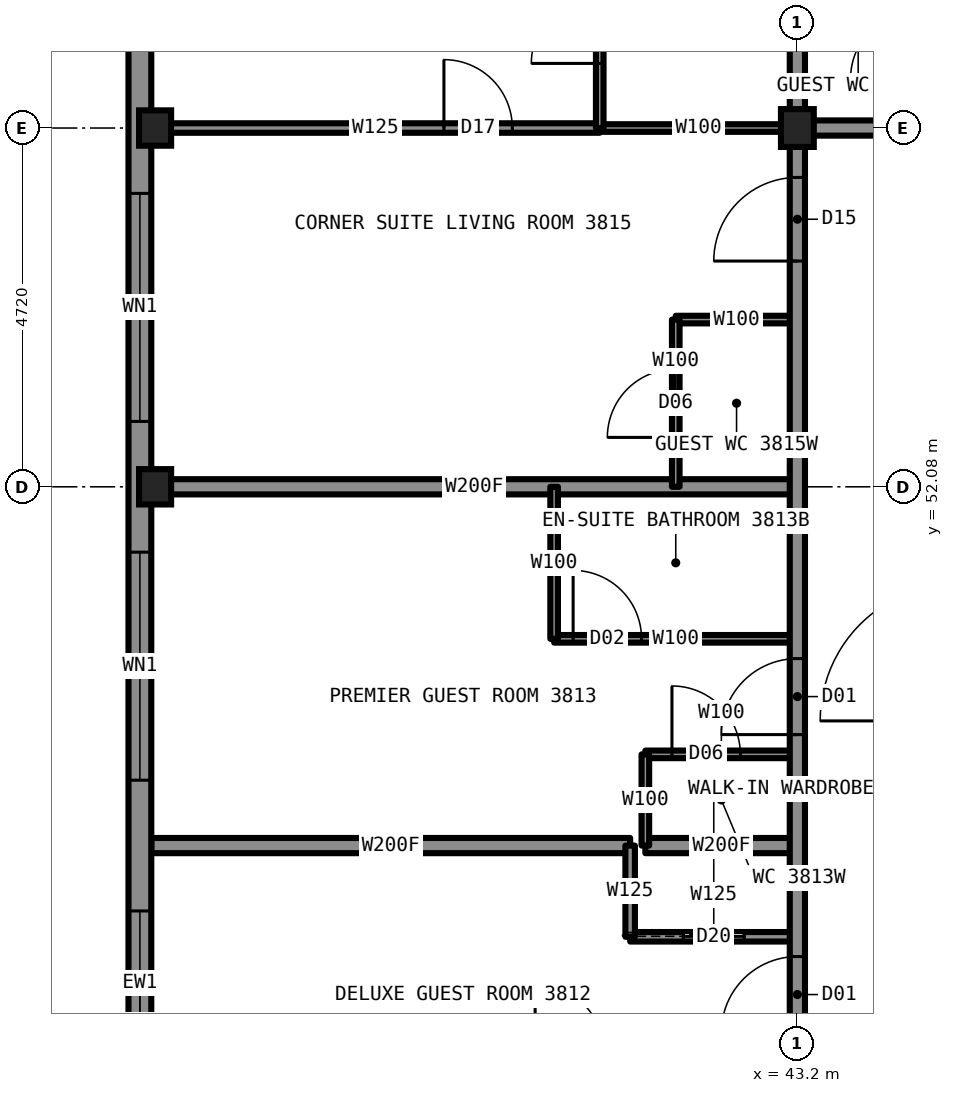
"""IFC4 building model, lengths in metres.
Left out: names, types, materials, properties, quantities, classifications, styles, units other than length and angle.
Written with IfcOpenShell. Run it as: python <this file> out.ifc"""

import sys

from ifc_helpers import new_model, si_unit, direction, frame, frame_2d, origin, origin_2d, place, context, subcontext, project, spatial, rectangle, i_section, extrude, element, fill, save


model = new_model("IFC4")
c1 = context("Model", 3, precision=1e-05, world=origin(), true_north=direction((0.0, 1.0)))
c2 = subcontext(c1, "Body", "Model", "MODEL_VIEW")
j1 = project(units=[si_unit("LENGTHUNIT", "METRE"), si_unit("PLANEANGLEUNIT", "RADIAN")], contexts=[c1])
p1 = place(None, origin())
s1 = spatial("IfcSite", under=j1, at=p1, CompositionType="ELEMENT")
p2 = place(p1, origin())
s2 = spatial("IfcBuilding", under=s1, at=p2, CompositionType="ELEMENT")
p3 = place(p2, frame((0.0, 0.0, 135.4)))
s3 = spatial("IfcBuildingStorey", under=s2, at=p3, CompositionType="ELEMENT", Elevation=135.4)
for number, where, z_axis, x_axis in (
    (1, (34.75, 52.08, 0.0), (0.0, 0.0, 1.0), (1.0, 0.0, 0.0)),
    (2, (34.75, 56.8, 0.0), (0.0, 0.0, 1.0), (1.0, 0.0, 0.0)),
):
    element("IfcColumn", number, at=place(p3, frame(where, z_axis=z_axis, x_axis=x_axis)), inside=s3, PredefinedType="COLUMN", context=c2, shape_type="SweptSolid", body=[
        extrude(i_section(OverallWidth=0.422, OverallDepth=0.465, WebThickness=0.045, FlangeThickness=0.073, at=origin_2d()), origin(), (0.0, 0.0, 1.0), 3.5),
    ])
p4 = place(p3, frame((43.2, 56.8, 0.0), z_axis=(0.0, 0.0, 1.0), x_axis=(1.0, 0.0, 0.0)))
e3 = element("IfcColumn", 3, at=p4, inside=s3, PredefinedType="COLUMN", context=c2, shape_type="SweptSolid", body=[
    extrude(i_section(OverallWidth=0.432, OverallDepth=0.498, WebThickness=0.056, FlangeThickness=0.089, at=origin_2d()), origin(), (0.0, 0.0, 1.0), 3.5),
])
p5 = place(p3, frame((41.0, 46.16, 0.0), z_axis=(0.0, 0.0, 1.0), x_axis=(1.0, 0.0, 0.0)))
e4 = element("IfcWall", 4, at=p5, inside=s3, PredefinedType="PARTITIONING", context=c2, shape_type="SweptSolid", body=[
    extrude(rectangle(XDim=2.2, YDim=0.125, at=frame_2d((1.1, 0.0))), origin(), (0.0, 0.0, 1.0), 3.33),
])
p6 = place(p5, frame((0.7, 0.0, 0.0)))
e5 = element("IfcOpeningElement", 5, at=p6, cuts=e4, PredefinedType="OPENING", context=c2, shape_type="SweptSolid", body=[
    extrude(rectangle(XDim=0.8, YDim=2.1, at=frame_2d((0.4, 1.05))), frame((0.0, 0.073, 0.0), z_axis=(0.0, -1.0, 0.0), x_axis=(1.0, 0.0, 0.0)), (0.0, 0.0, 1.0), 0.145),
])
p7 = place(p3, frame((40.6, 56.8, 0.0), z_axis=(0.0, 0.0, 1.0), x_axis=(1.0, 0.0, 0.0)))
e6 = element("IfcWall", 6, at=p7, inside=s3, PredefinedType="PARTITIONING", context=c2, shape_type="SweptSolid", body=[
    extrude(rectangle(XDim=2.6, YDim=0.1, at=frame_2d((1.3, 0.0))), origin(), (0.0, 0.0, 1.0), 2.573),
])
p8 = place(p3, frame((43.2, 56.8, 0.0), z_axis=(0.0, 0.0, 1.0), x_axis=(1.0, 0.0, 0.0)))
e7 = element("IfcWall", 7, at=p8, inside=s3, PredefinedType="PARTITIONING", context=c2, shape_type="SweptSolid", body=[
    extrude(rectangle(XDim=23.6, YDim=0.2, at=frame_2d((11.8, 0.0))), origin(), (0.0, 0.0, 1.0), 3.33),
])
p9 = place(p8, frame((1.85, 0.0, 0.0)))
e8 = element("IfcOpeningElement", 8, at=p9, cuts=e7, PredefinedType="OPENING", context=c2, shape_type="SweptSolid", body=[
    extrude(rectangle(XDim=1.1, YDim=2.2, at=frame_2d((0.55, 1.1))), frame((0.0, 0.11, 0.0), z_axis=(0.0, -1.0, 0.0), x_axis=(1.0, 0.0, 0.0)), (0.0, 0.0, 1.0), 0.22),
])
p10 = place(p8, frame((14.56, 0.0, 0.0)))
e9 = element("IfcOpeningElement", 9, at=p10, cuts=e7, PredefinedType="OPENING", context=c2, shape_type="SweptSolid", body=[
    extrude(rectangle(XDim=1.0, YDim=2.2, at=frame_2d((0.5, 1.1))), frame((0.0, 0.11, 0.0), z_axis=(0.0, -1.0, 0.0), x_axis=(1.0, 0.0, 0.0)), (0.0, 0.0, 1.0), 0.22),
])
p11 = place(p8, frame((21.14, 0.0, 0.0)))
e10 = element("IfcOpeningElement", 10, at=p11, cuts=e7, PredefinedType="OPENING", context=c2, shape_type="SweptSolid", body=[
    extrude(rectangle(XDim=1.0, YDim=2.2, at=frame_2d((0.5, 1.1))), frame((0.0, 0.11, 0.0), z_axis=(0.0, -1.0, 0.0), x_axis=(1.0, 0.0, 0.0)), (0.0, 0.0, 1.0), 0.22),
])
p12 = place(p3, frame((34.7, 56.8, 0.0), z_axis=(0.0, 0.0, 1.0), x_axis=(1.0, 0.0, 0.0)))
e11 = element("IfcWall", 11, at=p12, inside=s3, PredefinedType="PARTITIONING", context=c2, shape_type="SweptSolid", body=[
    extrude(rectangle(XDim=5.9, YDim=0.125, at=frame_2d((2.95, 0.0))), origin(), (0.0, 0.0, 1.0), 2.573),
])
p13 = place(p12, frame((3.85, 0.0, 0.0)))
e12 = element("IfcOpeningElement", 12, at=p13, cuts=e11, PredefinedType="OPENING", context=c2, shape_type="SweptSolid", body=[
    extrude(rectangle(XDim=0.9, YDim=2.2, at=frame_2d((0.45, 1.1))), frame((0.0, 0.073, 0.0), z_axis=(0.0, -1.0, 0.0), x_axis=(1.0, 0.0, 0.0)), (0.0, 0.0, 1.0), 0.145),
])
p14 = place(p3, frame((34.7, 47.36, 0.0), z_axis=(0.0, 0.0, 1.0), x_axis=(1.0, 0.0, 0.0)))
e13 = element("IfcWall", 13, at=p14, inside=s3, PredefinedType="PARTITIONING", context=c2, shape_type="SweptSolid", body=[
    extrude(rectangle(XDim=6.3, YDim=0.2, at=frame_2d((3.15, 0.0))), origin(), (0.0, 0.0, 1.0), 2.731),
])
p15 = place(p3, frame((41.2, 47.36, 0.0), z_axis=(0.0, 0.0, 1.0), x_axis=(1.0, 0.0, 0.0)))
e14 = element("IfcWall", 14, at=p15, inside=s3, PredefinedType="PARTITIONING", context=c2, shape_type="SweptSolid", body=[
    extrude(rectangle(XDim=2.0, YDim=0.2, at=frame_2d((1.0, 0.0))), origin(), (0.0, 0.0, 1.0), 2.731),
])
p16 = place(p3, frame((41.2, 48.56, 0.0), z_axis=(0.0, 0.0, 1.0), x_axis=(1.0, 0.0, 0.0)))
e15 = element("IfcWall", 15, at=p16, inside=s3, PredefinedType="PARTITIONING", context=c2, shape_type="SweptSolid", body=[
    extrude(rectangle(XDim=2.0, YDim=0.1, at=frame_2d((1.0, 0.0))), origin(), (0.0, 0.0, 1.0), 3.33),
])
p17 = place(p16, frame((0.35, 0.0, 0.0)))
e16 = element("IfcOpeningElement", 16, at=p17, cuts=e15, PredefinedType="OPENING", context=c2, shape_type="SweptSolid", body=[
    extrude(rectangle(XDim=0.9, YDim=2.1, at=frame_2d((0.45, 1.05))), frame((0.0, 0.06, 0.0), z_axis=(0.0, -1.0, 0.0), x_axis=(1.0, 0.0, 0.0)), (0.0, 0.0, 1.0), 0.12),
])
p18 = place(p3, frame((40.0, 50.08, 0.0), z_axis=(0.0, 0.0, 1.0), x_axis=(1.0, 0.0, 0.0)))
e17 = element("IfcWall", 17, at=p18, inside=s3, PredefinedType="PARTITIONING", context=c2, shape_type="SweptSolid", body=[
    extrude(rectangle(XDim=3.2, YDim=0.1, at=frame_2d((1.6, 0.0))), origin(), (0.0, 0.0, 1.0), 3.33),
])
p19 = place(p18, frame((0.25, 0.0, 0.0)))
e18 = element("IfcOpeningElement", 18, at=p19, cuts=e17, PredefinedType="OPENING", context=c2, shape_type="SweptSolid", body=[
    extrude(rectangle(XDim=0.9, YDim=2.1, at=frame_2d((0.45, 1.05))), frame((0.0, 0.06, 0.0), z_axis=(0.0, -1.0, 0.0), x_axis=(1.0, 0.0, 0.0)), (0.0, 0.0, 1.0), 0.12),
])
p20 = place(p3, frame((34.7, 52.08, 0.0), z_axis=(0.0, 0.0, 1.0), x_axis=(1.0, 0.0, 0.0)))
e19 = element("IfcWall", 19, at=p20, inside=s3, PredefinedType="PARTITIONING", context=c2, shape_type="SweptSolid", body=[
    extrude(rectangle(XDim=8.5, YDim=0.2, at=frame_2d((4.25, 0.0))), origin(), (0.0, 0.0, 1.0), 2.573),
])
p21 = place(p3, frame((41.6, 54.28, 0.0), z_axis=(0.0, 0.0, 1.0), x_axis=(1.0, 0.0, 0.0)))
e20 = element("IfcWall", 20, at=p21, inside=s3, PredefinedType="PARTITIONING", context=c2, shape_type="SweptSolid", body=[
    extrude(rectangle(XDim=1.6, YDim=0.1, at=frame_2d((0.8, 0.0))), origin(), (0.0, 0.0, 1.0), 3.33),
])
p22 = place(p3, frame((43.2, 33.2, 0.0), z_axis=(0.0, 0.0, 1.0), x_axis=(0.0, 1.0, 0.0)))
e21 = element("IfcWall", 21, at=p22, inside=s3, PredefinedType="PARTITIONING", context=c2, shape_type="SweptSolid", body=[
    extrude(rectangle(XDim=23.6, YDim=0.2, at=frame_2d((11.8, 0.0))), origin(), (0.0, 0.0, 1.0), 3.33),
])
p23 = place(p22, frame((6.98, 0.0, 0.0)))
e22 = element("IfcOpeningElement", 22, at=p23, cuts=e21, PredefinedType="OPENING", context=c2, shape_type="SweptSolid", body=[
    extrude(rectangle(XDim=1.0, YDim=2.2, at=frame_2d((0.5, 1.1))), frame((0.0, 0.11, 0.0), z_axis=(0.0, -1.0, 0.0), x_axis=(1.0, 0.0, 0.0)), (0.0, 0.0, 1.0), 0.22),
])
p24 = place(p22, frame((11.7, 0.0, 0.0)))
e23 = element("IfcOpeningElement", 23, at=p24, cuts=e21, PredefinedType="OPENING", context=c2, shape_type="SweptSolid", body=[
    extrude(rectangle(XDim=1.0, YDim=2.2, at=frame_2d((0.5, 1.1))), frame((0.0, 0.11, 0.0), z_axis=(0.0, -1.0, 0.0), x_axis=(1.0, 0.0, 0.0)), (0.0, 0.0, 1.0), 0.22),
])
p25 = place(p22, frame((15.62, 0.0, 0.0)))
e24 = element("IfcOpeningElement", 24, at=p25, cuts=e21, PredefinedType="OPENING", context=c2, shape_type="SweptSolid", body=[
    extrude(rectangle(XDim=1.0, YDim=2.2, at=frame_2d((0.5, 1.1))), frame((0.0, 0.11, 0.0), z_axis=(0.0, -1.0, 0.0), x_axis=(1.0, 0.0, 0.0)), (0.0, 0.0, 1.0), 0.22),
])
p26 = place(p22, frame((21.85, 0.0, 0.0)))
e25 = element("IfcOpeningElement", 25, at=p26, cuts=e21, PredefinedType="OPENING", context=c2, shape_type="SweptSolid", body=[
    extrude(rectangle(XDim=1.1, YDim=2.2, at=frame_2d((0.55, 1.1))), frame((0.0, 0.11, 0.0), z_axis=(0.0, -1.0, 0.0), x_axis=(1.0, 0.0, 0.0)), (0.0, 0.0, 1.0), 0.22),
])
p27 = place(p22, frame((0.65, 0.0, 0.0)))
e26 = element("IfcOpeningElement", 26, at=p27, cuts=e21, PredefinedType="OPENING", context=c2, shape_type="SweptSolid", body=[
    extrude(rectangle(XDim=1.1, YDim=2.2, at=frame_2d((0.55, 1.1))), frame((0.0, 0.11, 0.0), z_axis=(0.0, -1.0, 0.0), x_axis=(1.0, 0.0, 0.0)), (0.0, 0.0, 1.0), 0.22),
])
p28 = place(p3, frame((43.2, 56.8, 0.0), z_axis=(0.0, 0.0, 1.0), x_axis=(0.0, 1.0, 0.0)))
e27 = element("IfcWall", 27, at=p28, inside=s3, PredefinedType="PARTITIONING", context=c2, shape_type="SweptSolid", body=[
    extrude(rectangle(XDim=8.5, YDim=0.2, at=frame_2d((4.25, 0.0))), origin(), (0.0, 0.0, 1.0), 2.573),
])
p29 = place(p3, frame((41.6, 52.08, 0.0), z_axis=(0.0, 0.0, 1.0), x_axis=(0.0, 1.0, 0.0)))
e28 = element("IfcWall", 28, at=p29, inside=s3, PredefinedType="PARTITIONING", context=c2, shape_type="SweptSolid", body=[
    extrude(rectangle(XDim=2.2, YDim=0.1, at=frame_2d((1.1, 0.0))), origin(), (0.0, 0.0, 1.0), 3.33),
])
p30 = place(p29, frame((0.65, 0.0, 0.0)))
e29 = element("IfcOpeningElement", 29, at=p30, cuts=e28, PredefinedType="OPENING", context=c2, shape_type="SweptSolid", body=[
    extrude(rectangle(XDim=0.9, YDim=2.1, at=frame_2d((0.45, 1.05))), frame((0.0, 0.06, 0.0), z_axis=(0.0, -1.0, 0.0), x_axis=(1.0, 0.0, 0.0)), (0.0, 0.0, 1.0), 0.12),
])
p31 = place(p3, frame((41.2, 47.36, 0.0), z_axis=(0.0, 0.0, 1.0), x_axis=(0.0, 1.0, 0.0)))
e30 = element("IfcWall", 30, at=p31, inside=s3, PredefinedType="PARTITIONING", context=c2, shape_type="SweptSolid", body=[
    extrude(rectangle(XDim=1.2, YDim=0.1, at=frame_2d((0.6, 0.0))), origin(), (0.0, 0.0, 1.0), 3.33),
])
p32 = place(p3, frame((41.0, 46.16, 0.0), z_axis=(0.0, 0.0, 1.0), x_axis=(0.0, 1.0, 0.0)))
e31 = element("IfcWall", 31, at=p32, inside=s3, PredefinedType="PARTITIONING", context=c2, shape_type="SweptSolid", body=[
    extrude(rectangle(XDim=1.2, YDim=0.125, at=frame_2d((0.6, 0.0))), origin(), (0.0, 0.0, 1.0), 3.33),
])
p33 = place(p3, frame((40.6, 56.8, 0.0), z_axis=(0.0, 0.0, 1.0), x_axis=(0.0, 1.0, 0.0)))
e32 = element("IfcWall", 32, at=p33, inside=s3, PredefinedType="PARTITIONING", context=c2, shape_type="SweptSolid", body=[
    extrude(rectangle(XDim=2.6, YDim=0.1, at=frame_2d((1.3, 0.0))), origin(), (0.0, 0.0, 1.0), 3.33),
])
p34 = place(p33, frame((0.85, 0.0, 0.0)))
e33 = element("IfcOpeningElement", 33, at=p34, cuts=e32, PredefinedType="OPENING", context=c2, shape_type="SweptSolid", body=[
    extrude(rectangle(XDim=0.9, YDim=2.1, at=frame_2d((0.45, 1.05))), frame((0.0, 0.06, 0.0), z_axis=(0.0, -1.0, 0.0), x_axis=(1.0, 0.0, 0.0)), (0.0, 0.0, 1.0), 0.12),
])
p35 = place(p3, frame((40.0, 50.08, 0.0), z_axis=(0.0, 0.0, 1.0), x_axis=(0.0, 1.0, 0.0)))
e34 = element("IfcWall", 34, at=p35, inside=s3, PredefinedType="PARTITIONING", context=c2, shape_type="SweptSolid", body=[
    extrude(rectangle(XDim=2.0, YDim=0.1, at=frame_2d((1.0, 0.0))), origin(), (0.0, 0.0, 1.0), 3.33),
])
p36 = place(p3, frame((34.55, 60.1, 0.0), z_axis=(0.0, 0.0, 1.0), x_axis=(0.0, -1.0, 0.0)))
e35 = element("IfcWall", 35, at=p36, inside=s3, PredefinedType="SOLIDWALL", context=c2, shape_type="SweptSolid", body=[
    extrude(rectangle(XDim=30.2, YDim=0.3, at=frame_2d((15.1, 0.0))), origin(), (0.0, 0.0, 1.0), 2.83),
])
p37 = place(p36, frame((0.85, 0.0, 0.5)))
e36 = element("IfcOpeningElement", 36, at=p37, cuts=e35, PredefinedType="OPENING", context=c2, shape_type="SweptSolid", body=[
    extrude(rectangle(XDim=1.6, YDim=2.0, at=frame_2d((0.8, 1.0))), frame((0.0, 0.16, 0.0), z_axis=(0.0, -1.0, 0.0), x_axis=(1.0, 0.0, 0.0)), (0.0, 0.0, 1.0), 0.32),
])
p38 = place(p36, frame((4.16, 0.0, 0.5)))
e37 = element("IfcOpeningElement", 37, at=p38, cuts=e35, PredefinedType="OPENING", context=c2, shape_type="SweptSolid", body=[
    extrude(rectangle(XDim=1.3, YDim=1.9, at=frame_2d((0.65, 0.95))), frame((0.0, 0.16, 0.0), z_axis=(0.0, -1.0, 0.0), x_axis=(1.0, 0.0, 0.0)), (0.0, 0.0, 1.0), 0.32),
])
p39 = place(p36, frame((8.88, 0.0, 0.5)))
e38 = element("IfcOpeningElement", 38, at=p39, cuts=e35, PredefinedType="OPENING", context=c2, shape_type="SweptSolid", body=[
    extrude(rectangle(XDim=3.0, YDim=2.0, at=frame_2d((1.5, 1.0))), frame((0.0, 0.16, 0.0), z_axis=(0.0, -1.0, 0.0), x_axis=(1.0, 0.0, 0.0)), (0.0, 0.0, 1.0), 0.32),
])
p40 = place(p36, frame((13.6, 0.0, 0.5)))
e39 = element("IfcOpeningElement", 39, at=p40, cuts=e35, PredefinedType="OPENING", context=c2, shape_type="SweptSolid", body=[
    extrude(rectangle(XDim=3.0, YDim=2.0, at=frame_2d((1.5, 1.0))), frame((0.0, 0.16, 0.0), z_axis=(0.0, -1.0, 0.0), x_axis=(1.0, 0.0, 0.0)), (0.0, 0.0, 1.0), 0.32),
])
p41 = place(p36, frame((18.32, 0.0, 0.5)))
e40 = element("IfcOpeningElement", 40, at=p41, cuts=e35, PredefinedType="OPENING", context=c2, shape_type="SweptSolid", body=[
    extrude(rectangle(XDim=3.0, YDim=2.0, at=frame_2d((1.5, 1.0))), frame((0.0, 0.16, 0.0), z_axis=(0.0, -1.0, 0.0), x_axis=(1.0, 0.0, 0.0)), (0.0, 0.0, 1.0), 0.32),
])
p42 = place(p36, frame((24.69, 0.0, 0.5)))
e41 = element("IfcOpeningElement", 41, at=p42, cuts=e35, PredefinedType="OPENING", context=c2, shape_type="SweptSolid", body=[
    extrude(rectangle(XDim=1.3, YDim=1.9, at=frame_2d((0.65, 0.95))), frame((0.0, 0.16, 0.0), z_axis=(0.0, -1.0, 0.0), x_axis=(1.0, 0.0, 0.0)), (0.0, 0.0, 1.0), 0.32),
])
p43 = place(p36, frame((27.75, 0.0, 0.5)))
e42 = element("IfcOpeningElement", 42, at=p43, cuts=e35, PredefinedType="OPENING", context=c2, shape_type="SweptSolid", body=[
    extrude(rectangle(XDim=1.6, YDim=2.0, at=frame_2d((0.8, 1.0))), frame((0.0, 0.16, 0.0), z_axis=(0.0, -1.0, 0.0), x_axis=(1.0, 0.0, 0.0)), (0.0, 0.0, 1.0), 0.32),
])
p44 = place(p36, frame((5.51, 0.0, 0.5)))
e43 = element("IfcOpeningElement", 43, at=p44, cuts=e35, PredefinedType="OPENING", context=c2, shape_type="SweptSolid", body=[
    extrude(rectangle(XDim=0.7, YDim=0.9, at=frame_2d((0.35, 0.45))), frame((0.0, 0.16, 0.0), z_axis=(0.0, -1.0, 0.0), x_axis=(1.0, 0.0, 0.0)), (0.0, 0.0, 1.0), 0.32),
])
p45 = place(p36, frame((23.99, 0.0, 0.5)))
e44 = element("IfcOpeningElement", 44, at=p45, cuts=e35, PredefinedType="OPENING", context=c2, shape_type="SweptSolid", body=[
    extrude(rectangle(XDim=0.7, YDim=0.9, at=frame_2d((0.35, 0.45))), frame((0.0, 0.16, 0.0), z_axis=(0.0, -1.0, 0.0), x_axis=(1.0, 0.0, 0.0)), (0.0, 0.0, 1.0), 0.32),
])
p46 = place(p24, origin())
e45 = element("IfcDoor", 45, at=p46, inside=s3, OperationType="SINGLE_SWING_LEFT", PredefinedType="DOOR", context=c2, shape_type="SweptSolid", body=[
    extrude(rectangle(XDim=1.0, YDim=2.2, at=frame_2d((0.5, 1.1))), frame((0.0, 0.025, 0.0), z_axis=(0.0, -1.0, 0.0), x_axis=(1.0, 0.0, 0.0)), (0.0, 0.0, 1.0), 0.05),
])
fill(e23, e45)
p47 = place(p6, origin())
e46 = element("IfcDoor", 46, at=p47, inside=s3, OperationType="SLIDING_TO_LEFT", PredefinedType="DOOR", context=c2, shape_type="SweptSolid", body=[
    extrude(rectangle(XDim=0.8, YDim=2.1, at=frame_2d((0.4, 1.05))), frame((0.0, 0.025, 0.0), z_axis=(0.0, -1.0, 0.0), x_axis=(1.0, 0.0, 0.0)), (0.0, 0.0, 1.0), 0.05),
])
fill(e5, e46)
p48 = place(p25, origin())
e47 = element("IfcDoor", 47, at=p48, inside=s3, OperationType="SINGLE_SWING_LEFT", PredefinedType="DOOR", context=c2, shape_type="SweptSolid", body=[
    extrude(rectangle(XDim=1.0, YDim=2.2, at=frame_2d((0.5, 1.1))), frame((0.0, 0.025, 0.0), z_axis=(0.0, -1.0, 0.0), x_axis=(1.0, 0.0, 0.0)), (0.0, 0.0, 1.0), 0.05),
])
fill(e24, e47)
p49 = place(p19, origin())
e48 = element("IfcDoor", 48, at=p49, inside=s3, OperationType="SINGLE_SWING_RIGHT", PredefinedType="DOOR", context=c2, shape_type="SweptSolid", body=[
    extrude(rectangle(XDim=0.9, YDim=2.1, at=frame_2d((0.45, 1.05))), frame((0.0, 0.025, 0.0), z_axis=(0.0, -1.0, 0.0), x_axis=(1.0, 0.0, 0.0)), (0.0, 0.0, 1.0), 0.05),
])
fill(e18, e48)
p50 = place(p17, origin())
e49 = element("IfcDoor", 49, at=p50, inside=s3, OperationType="SINGLE_SWING_LEFT", PredefinedType="DOOR", context=c2, shape_type="SweptSolid", body=[
    extrude(rectangle(XDim=0.9, YDim=2.1, at=frame_2d((0.45, 1.05))), frame((0.0, 0.025, 0.0), z_axis=(0.0, -1.0, 0.0), x_axis=(1.0, 0.0, 0.0)), (0.0, 0.0, 1.0), 0.05),
])
fill(e16, e49)
p51 = place(p26, origin())
e50 = element("IfcDoor", 50, at=p51, inside=s3, OperationType="SINGLE_SWING_LEFT", PredefinedType="DOOR", context=c2, shape_type="SweptSolid", body=[
    extrude(rectangle(XDim=1.1, YDim=2.2, at=frame_2d((0.55, 1.1))), frame((0.0, 0.025, 0.0), z_axis=(0.0, -1.0, 0.0), x_axis=(1.0, 0.0, 0.0)), (0.0, 0.0, 1.0), 0.05),
])
fill(e25, e50)
p52 = place(p34, origin())
e51 = element("IfcDoor", 51, at=p52, inside=s3, OperationType="SINGLE_SWING_RIGHT", PredefinedType="DOOR", context=c2, shape_type="SweptSolid", body=[
    extrude(rectangle(XDim=0.9, YDim=2.1, at=frame_2d((0.45, 1.05))), frame((0.0, 0.025, 0.0), z_axis=(0.0, -1.0, 0.0), x_axis=(1.0, 0.0, 0.0)), (0.0, 0.0, 1.0), 0.05),
])
fill(e33, e51)
p53 = place(p13, origin())
e52 = element("IfcDoor", 52, at=p53, inside=s3, OperationType="SINGLE_SWING_LEFT", PredefinedType="DOOR", context=c2, shape_type="SweptSolid", body=[
    extrude(rectangle(XDim=0.9, YDim=2.2, at=frame_2d((0.45, 1.1))), frame((0.0, 0.025, 0.0), z_axis=(0.0, -1.0, 0.0), x_axis=(1.0, 0.0, 0.0)), (0.0, 0.0, 1.0), 0.05),
])
fill(e12, e52)
p54 = place(p30, origin())
e53 = element("IfcDoor", 53, at=p54, inside=s3, OperationType="SINGLE_SWING_LEFT", PredefinedType="DOOR", context=c2, shape_type="SweptSolid", body=[
    extrude(rectangle(XDim=0.9, YDim=2.1, at=frame_2d((0.45, 1.05))), frame((0.0, 0.025, 0.0), z_axis=(0.0, -1.0, 0.0), x_axis=(1.0, 0.0, 0.0)), (0.0, 0.0, 1.0), 0.05),
])
fill(e29, e53)
p55 = place(p37, origin())
e54 = element("IfcWindow", 54, at=p55, inside=s3, PartitioningType="SINGLE_PANEL", PredefinedType="WINDOW", context=c2, shape_type="SweptSolid", body=[
    extrude(rectangle(XDim=1.6, YDim=2.0, at=frame_2d((0.8, 1.0))), frame((0.0, 0.03, 0.0), z_axis=(0.0, -1.0, 0.0), x_axis=(1.0, 0.0, 0.0)), (0.0, 0.0, 1.0), 0.06),
])
fill(e36, e54)
p56 = place(p38, origin())
e55 = element("IfcWindow", 55, at=p56, inside=s3, PartitioningType="SINGLE_PANEL", PredefinedType="WINDOW", context=c2, shape_type="SweptSolid", body=[
    extrude(rectangle(XDim=1.3, YDim=1.9, at=frame_2d((0.65, 0.95))), frame((0.0, 0.03, 0.0), z_axis=(0.0, -1.0, 0.0), x_axis=(1.0, 0.0, 0.0)), (0.0, 0.0, 1.0), 0.06),
])
fill(e37, e55)
p57 = place(p39, origin())
e56 = element("IfcWindow", 56, at=p57, inside=s3, PartitioningType="SINGLE_PANEL", PredefinedType="WINDOW", context=c2, shape_type="SweptSolid", body=[
    extrude(rectangle(XDim=3.0, YDim=2.0, at=frame_2d((1.5, 1.0))), frame((0.0, 0.03, 0.0), z_axis=(0.0, -1.0, 0.0), x_axis=(1.0, 0.0, 0.0)), (0.0, 0.0, 1.0), 0.06),
])
fill(e38, e56)
p58 = place(p40, origin())
e57 = element("IfcWindow", 57, at=p58, inside=s3, PartitioningType="SINGLE_PANEL", PredefinedType="WINDOW", context=c2, shape_type="SweptSolid", body=[
    extrude(rectangle(XDim=3.0, YDim=2.0, at=frame_2d((1.5, 1.0))), frame((0.0, 0.03, 0.0), z_axis=(0.0, -1.0, 0.0), x_axis=(1.0, 0.0, 0.0)), (0.0, 0.0, 1.0), 0.06),
])
fill(e39, e57)
p59 = place(p44, origin())
e58 = element("IfcWindow", 58, at=p59, inside=s3, PartitioningType="SINGLE_PANEL", PredefinedType="WINDOW", context=c2, shape_type="SweptSolid", body=[
    extrude(rectangle(XDim=0.7, YDim=0.9, at=frame_2d((0.35, 0.45))), frame((0.0, 0.03, 0.0), z_axis=(0.0, -1.0, 0.0), x_axis=(1.0, 0.0, 0.0)), (0.0, 0.0, 1.0), 0.06),
])
fill(e43, e58)
save(model, sys.argv[1])
